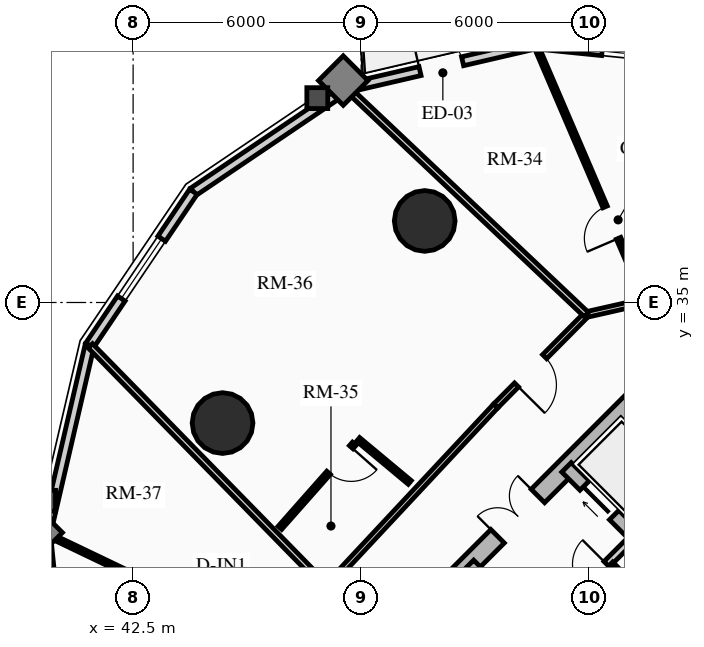
"""IFC4 building model, lengths in metres.
Left out: names, types, materials, properties, quantities, classifications, styles, units other than length and angle.
Written with IfcOpenShell. Run it as: python <this file> out.ifc"""

import sys

from ifc_helpers import new_model, si_unit, direction, frame, frame_2d, origin, origin_2d, place, context, subcontext, project, spatial, rectangle, circle, extrude, source, transform, mapped, element, fill, save


model = new_model("IFC4")
c1 = context("Model", 3, precision=1e-05, world=origin(), true_north=direction((0.0, 1.0)))
c2 = subcontext(c1, "Body", "Model", "MODEL_VIEW")
j1 = project(units=[si_unit("LENGTHUNIT", "METRE"), si_unit("PLANEANGLEUNIT", "RADIAN")], contexts=[c1])
p1 = place(None, origin())
s1 = spatial("IfcSite", under=j1, at=p1, CompositionType="ELEMENT")
p2 = place(p1, origin())
s2 = spatial("IfcBuilding", under=s1, at=p2, CompositionType="ELEMENT")
p3 = place(p2, frame((0.0, 0.0, 30.73)))
s3 = spatial("IfcBuildingStorey", under=s2, at=p3, CompositionType="ELEMENT", Elevation=30.73)
p4 = place(p3, frame((48.838, 25.596, 0.0), z_axis=(0.0, 0.0, 1.0), x_axis=(0.707106781187, 0.707106781187, 0.0)))
e1 = element("IfcWall", 1, at=p4, inside=s3, PredefinedType="SHEAR", context=c2, shape_type="SweptSolid", body=[
    extrude(rectangle(XDim=10.7, YDim=0.5, at=frame_2d((5.35, 0.0))), origin(), (0.0, 0.0, 1.0), 2.91),
])
m1 = source(origin(), c2, "Body", "SweptSolid", [
    extrude(rectangle(XDim=1.5, YDim=2.02, at=frame_2d((0.75, 1.01))), frame((0.0, 0.26, 0.0), z_axis=(0.0, -1.0, 0.0), x_axis=(1.0, 0.0, 0.0)), (0.0, 0.0, 1.0), 0.52),
])
p5 = place(p4, frame((4.6, 0.0, 0.0)))
e2 = element("IfcOpeningElement", 2, at=p5, cuts=e1, PredefinedType="OPENING", context=c2, shape_type="MappedRepresentation", body=[
    mapped(m1, transform((0.0, 0.0, 0.0), x_axis=(1.0, 0.0, 0.0), y_axis=(0.0, 1.0, 0.0), z_axis=(0.0, 0.0, 1.0), scale=1.0)),
])
p6 = place(p3, frame((61.096, 18.338, 0.0), z_axis=(0.0, 0.0, 1.0), x_axis=(-0.707106781187, 0.707106781187, 0.0)))
e3 = element("IfcWall", 3, at=p6, inside=s3, PredefinedType="SHEAR", context=c2, shape_type="SweptSolid", body=[
    extrude(rectangle(XDim=13.8, YDim=0.35, at=frame_2d((6.9, 0.0))), origin(), (0.0, 0.0, 1.0), 2.91),
])
m2 = source(origin(), c2, "Body", "SweptSolid", [
    extrude(rectangle(XDim=1.1, YDim=2.015, at=frame_2d((0.55, 1.007))), frame((0.0, 0.185, 0.0), z_axis=(0.0, -1.0, 0.0), x_axis=(1.0, 0.0, 0.0)), (0.0, 0.0, 1.0), 0.37),
])
p7 = place(p6, frame((4.9, 0.0, 0.0)))
e4 = element("IfcOpeningElement", 4, at=p7, cuts=e3, PredefinedType="OPENING", context=c2, shape_type="MappedRepresentation", body=[
    mapped(m2, transform((0.0, 0.0, 0.0), x_axis=(1.0, 0.0, 0.0), y_axis=(0.0, 1.0, 0.0), z_axis=(0.0, 0.0, 1.0), scale=1.0)),
])
m3 = source(origin(), c2, "Body", "SweptSolid", [
    extrude(rectangle(XDim=1.15, YDim=2.02, at=frame_2d((0.575, 1.01))), frame((0.0, 0.185, 0.0), z_axis=(0.0, -1.0, 0.0), x_axis=(1.0, 0.0, 0.0)), (0.0, 0.0, 1.0), 0.37),
])
p8 = place(p6, frame((7.32, 0.0, 0.0)))
e5 = element("IfcOpeningElement", 5, at=p8, cuts=e3, PredefinedType="OPENING", context=c2, shape_type="MappedRepresentation", body=[
    mapped(m3, transform((0.0, 0.0, 0.0), x_axis=(1.0, 0.0, 0.0), y_axis=(0.0, 1.0, 0.0), z_axis=(0.0, 0.0, 1.0), scale=1.0)),
])
p9 = place(p3, frame((63.662, 20.904, 0.0), z_axis=(0.0, 0.0, 1.0), x_axis=(-0.707106781187, 0.707106781187, 0.0)))
e6 = element("IfcWall", 6, at=p9, inside=s3, PredefinedType="SHEAR", context=c2, shape_type="SweptSolid", body=[
    extrude(rectangle(XDim=13.8, YDim=0.35, at=frame_2d((6.9, 0.0))), origin(), (0.0, 0.0, 1.0), 2.91),
])
p10 = place(p9, frame((10.025, 0.0, 0.0)))
e7 = element("IfcOpeningElement", 7, at=p10, cuts=e6, PredefinedType="OPENING", context=c2, shape_type="MappedRepresentation", body=[
    mapped(m2, transform((0.0, 0.0, 0.0), x_axis=(1.0, 0.0, 0.0), y_axis=(0.0, 1.0, 0.0), z_axis=(0.0, 0.0, 1.0), scale=1.0)),
])
p11 = place(p9, frame((12.025, 0.0, 0.0)))
e8 = element("IfcOpeningElement", 8, at=p11, cuts=e6, PredefinedType="OPENING", context=c2, shape_type="MappedRepresentation", body=[
    mapped(m2, transform((0.0, 0.0, 0.0), x_axis=(1.0, 0.0, 0.0), y_axis=(0.0, 1.0, 0.0), z_axis=(0.0, 0.0, 1.0), scale=1.0)),
])
p12 = place(p9, frame((5.33, 0.0, 0.0)))
e9 = element("IfcOpeningElement", 9, at=p12, cuts=e6, PredefinedType="OPENING", context=c2, shape_type="MappedRepresentation", body=[
    mapped(m3, transform((0.0, 0.0, 0.0), x_axis=(1.0, 0.0, 0.0), y_axis=(0.0, 1.0, 0.0), z_axis=(0.0, 0.0, 1.0), scale=1.0)),
])
for number, where, z_axis, x_axis in (
    (10, (50.173, 37.146, 0.0), (0.0, 0.0, 1.0), (1.0, 0.0, 0.0)),
    (11, (44.854, 31.827, 0.0), (0.0, 0.0, 1.0), (1.0, 0.0, 0.0)),
):
    element("IfcColumn", number, at=place(p3, frame(where, z_axis=z_axis, x_axis=x_axis)), inside=s3, PredefinedType="USERDEFINED", context=c2, shape_type="SweptSolid", body=[
        extrude(circle(Radius=0.8, at=origin_2d()), origin(), (0.0, 0.0, 1.0), 2.91),
    ])
p13 = place(p3, frame((53.09, 41.794, 0.0), z_axis=(0.0, 0.0, 1.0), x_axis=(0.994968263437, -0.100190592135, 0.0)))
e12 = element("IfcWall", 12, at=p13, inside=s3, PredefinedType="SOLIDWALL", context=c2, shape_type="SweptSolid", body=[
    extrude(rectangle(XDim=5.419, YDim=0.24, at=frame_2d((2.71, 0.0))), origin(), (0.0, 0.0, 1.0), 2.073),
])
m4 = source(origin(), c2, "Body", "SweptSolid", [
    extrude(rectangle(XDim=1.9, YDim=1.35, at=frame_2d((0.95, 0.675))), frame((0.0, 0.13, 0.0), z_axis=(0.0, -1.0, 0.0), x_axis=(1.0, 0.0, 0.0)), (0.0, 0.0, 1.0), 0.26),
])
p14 = place(p13, frame((1.76, 0.0, 0.65)))
e13 = element("IfcOpeningElement", 13, at=p14, cuts=e12, PredefinedType="OPENING", context=c2, shape_type="MappedRepresentation", body=[
    mapped(m4, transform((0.0, 0.0, 0.0), x_axis=(1.0, 0.0, 0.0), y_axis=(0.0, 1.0, 0.0), z_axis=(0.0, 0.0, 1.0), scale=1.0)),
])
p15 = place(p3, frame((48.129, 40.644, 0.0), z_axis=(0.0, 0.0, 1.0), x_axis=(0.974167686491, 0.22582585901, 0.0)))
e14 = element("IfcWall", 14, at=p15, inside=s3, PredefinedType="SOLIDWALL", context=c2, shape_type="SweptSolid", body=[
    extrude(rectangle(XDim=5.092, YDim=0.24, at=frame_2d((2.546, 0.0))), origin(), (0.0, 0.0, 1.0), 2.073),
])
m5 = source(origin(), c2, "Body", "SweptSolid", [
    extrude(rectangle(XDim=1.15, YDim=2.005, at=frame_2d((0.575, 1.002))), frame((0.0, 0.13, 0.0), z_axis=(0.0, -1.0, 0.0), x_axis=(1.0, 0.0, 0.0)), (0.0, 0.0, 1.0), 0.26),
])
p16 = place(p15, frame((1.971, 0.0, 0.0)))
e15 = element("IfcOpeningElement", 15, at=p16, cuts=e14, PredefinedType="OPENING", context=c2, shape_type="MappedRepresentation", body=[
    mapped(m5, transform((0.0, 0.0, 0.0), x_axis=(1.0, 0.0, 0.0), y_axis=(0.0, 1.0, 0.0), z_axis=(0.0, 0.0, 1.0), scale=1.0)),
])
p17 = place(p3, frame((44.086, 37.914, 0.0), z_axis=(0.0, 0.0, 1.0), x_axis=(0.828748297084, 0.559621532896, 0.0)))
e16 = element("IfcWall", 16, at=p17, inside=s3, PredefinedType="SOLIDWALL", context=c2, shape_type="SweptSolid", body=[
    extrude(rectangle(XDim=4.879, YDim=0.24, at=frame_2d((2.439, 0.0))), origin(), (0.0, 0.0, 1.0), 2.073),
])
p18 = place(p3, frame((41.356, 33.871, 0.0), z_axis=(0.0, 0.0, 1.0), x_axis=(0.559621532896, 0.828748297084, 0.0)))
e17 = element("IfcWall", 17, at=p18, inside=s3, PredefinedType="SOLIDWALL", context=c2, shape_type="SweptSolid", body=[
    extrude(rectangle(XDim=4.879, YDim=0.24, at=frame_2d((2.439, 0.0))), origin(), (0.0, 0.0, 1.0), 2.073),
])
p19 = place(p18, frame((1.489, 0.0, 0.65)))
e18 = element("IfcOpeningElement", 18, at=p19, cuts=e17, PredefinedType="OPENING", context=c2, shape_type="MappedRepresentation", body=[
    mapped(m4, transform((0.0, 0.0, 0.0), x_axis=(1.0, 0.0, 0.0), y_axis=(0.0, 1.0, 0.0), z_axis=(0.0, 0.0, 1.0), scale=1.0)),
])
p20 = place(p3, frame((40.206, 28.91, 0.0), z_axis=(0.0, 0.0, 1.0), x_axis=(0.22582585901, 0.974167686491, 0.0)))
e19 = element("IfcWall", 19, at=p20, inside=s3, PredefinedType="SOLIDWALL", context=c2, shape_type="SweptSolid", body=[
    extrude(rectangle(XDim=5.092, YDim=0.24, at=frame_2d((2.546, 0.0))), origin(), (0.0, 0.0, 1.0), 2.073),
])
p21 = place(p3, frame((40.749, 23.518, 0.0), z_axis=(0.0, 0.0, 1.0), x_axis=(-0.100190592135, 0.994968263437, 0.0)))
e20 = element("IfcWall", 20, at=p21, inside=s3, PredefinedType="SOLIDWALL", context=c2, shape_type="SweptSolid", body=[
    extrude(rectangle(XDim=5.419, YDim=0.24, at=frame_2d((2.71, 0.0))), origin(), (0.0, 0.0, 1.0), 2.073),
])
m6 = source(origin(), c2, "Body", "SweptSolid", [
    extrude(rectangle(XDim=2.2, YDim=1.35, at=frame_2d((1.1, 0.675))), frame((0.0, 0.13, 0.0), z_axis=(0.0, -1.0, 0.0), x_axis=(1.0, 0.0, 0.0)), (0.0, 0.0, 1.0), 0.26),
])
p22 = place(p21, frame((1.61, 0.0, 0.65)))
e21 = element("IfcOpeningElement", 21, at=p22, cuts=e20, PredefinedType="OPENING", context=c2, shape_type="MappedRepresentation", body=[
    mapped(m6, transform((0.0, 0.0, 0.0), x_axis=(1.0, 0.0, 0.0), y_axis=(0.0, 1.0, 0.0), z_axis=(0.0, 0.0, 1.0), scale=1.0)),
])
p23 = place(p3, frame((53.264, 26.416, 0.0), z_axis=(0.0, 0.0, 1.0), x_axis=(0.707106781187, 0.707106781187, 0.0)))
e22 = element("IfcWall", 22, at=p23, inside=s3, PredefinedType="PARTITIONING", context=c2, shape_type="SweptSolid", body=[
    extrude(rectangle(XDim=3.28, YDim=0.2, at=frame_2d((1.64, 0.0))), origin(), (0.0, 0.0, 1.0), 2.635),
])
m7 = source(origin(), c2, "Body", "SweptSolid", [
    extrude(rectangle(XDim=1.0, YDim=2.015, at=frame_2d((0.5, 1.007))), frame((0.0, 0.11, 0.0), z_axis=(0.0, -1.0, 0.0), x_axis=(1.0, 0.0, 0.0)), (0.0, 0.0, 1.0), 0.22),
])
p24 = place(p23, frame((0.14, 0.0, 0.0)))
e23 = element("IfcOpeningElement", 23, at=p24, cuts=e22, PredefinedType="OPENING", context=c2, shape_type="MappedRepresentation", body=[
    mapped(m7, transform((0.0, 0.0, 0.0), x_axis=(1.0, 0.0, 0.0), y_axis=(0.0, 1.0, 0.0), z_axis=(0.0, 0.0, 1.0), scale=1.0)),
])
m8 = source(origin(), c2, "Body", "SweptSolid", [
    extrude(rectangle(XDim=0.9, YDim=2.005, at=frame_2d((0.45, 1.002))), frame((0.0, 0.11, 0.0), z_axis=(0.0, -1.0, 0.0), x_axis=(1.0, 0.0, 0.0)), (0.0, 0.0, 1.0), 0.22),
])
p25 = place(p23, frame((1.5, 0.0, 0.0)))
e24 = element("IfcOpeningElement", 24, at=p25, cuts=e22, PredefinedType="OPENING", context=c2, shape_type="MappedRepresentation", body=[
    mapped(m8, transform((0.0, 0.0, 0.0), x_axis=(1.0, 0.0, 0.0), y_axis=(0.0, 1.0, 0.0), z_axis=(0.0, 0.0, 1.0), scale=1.0)),
])
p26 = place(p3, frame((56.673, 26.529, 0.0), z_axis=(0.0, 0.0, 1.0), x_axis=(-0.707052764397, 0.70716079385, 0.0)))
e25 = element("IfcWall", 25, at=p26, inside=s3, PredefinedType="PARTITIONING", context=c2, shape_type="SweptSolid", body=[
    extrude(rectangle(XDim=2.26, YDim=0.125, at=frame_2d((1.13, 0.0))), origin(), (0.0, 0.0, 1.0), 2.635),
])
m9 = source(origin(), c2, "Body", "SweptSolid", [
    extrude(rectangle(XDim=0.9, YDim=2.005, at=frame_2d((0.45, 1.002))), frame((0.0, 0.073, 0.0), z_axis=(0.0, -1.0, 0.0), x_axis=(1.0, 0.0, 0.0)), (0.0, 0.0, 1.0), 0.145),
])
p27 = place(p26, frame((0.65, 0.0, 0.0)))
e26 = element("IfcOpeningElement", 26, at=p27, cuts=e25, PredefinedType="OPENING", context=c2, shape_type="MappedRepresentation", body=[
    mapped(m9, transform((0.0, 0.0, 0.0), x_axis=(1.0, 0.0, 0.0), y_axis=(0.0, 1.0, 0.0), z_axis=(0.0, 0.0, 1.0), scale=1.0)),
])
p28 = place(p3, frame((55.984, 35.035, 0.0), z_axis=(0.0, 0.0, 1.0), x_axis=(-0.975290305708, -0.22092718165, 0.0)))
e27 = element("IfcWall", 27, at=p28, inside=s3, PredefinedType="PARTITIONING", context=c2, shape_type="SweptSolid", body=[
    extrude(rectangle(XDim=1.597, YDim=0.15, at=frame_2d((0.798, 0.0))), origin(), (0.0, 0.0, 1.0), 2.205),
])
p29 = place(p3, frame((54.427, 34.683, 0.0), z_axis=(0.0, 0.0, 1.0), x_axis=(-0.704178989986, -0.710022499687, 0.0)))
e28 = element("IfcWall", 28, at=p29, inside=s3, PredefinedType="PARTITIONING", context=c2, shape_type="SweptSolid", body=[
    extrude(rectangle(XDim=3.384, YDim=0.15, at=frame_2d((1.692, 0.0))), origin(), (0.0, 0.0, 1.0), 2.159),
])
m10 = source(origin(), c2, "Body", "SweptSolid", [
    extrude(rectangle(XDim=1.05, YDim=2.015, at=frame_2d((0.525, 1.007))), frame((0.0, 0.085, 0.0), z_axis=(0.0, -1.0, 0.0), x_axis=(1.0, 0.0, 0.0)), (0.0, 0.0, 1.0), 0.17),
])
p30 = place(p29, frame((1.56, 0.0, 0.0)))
e29 = element("IfcOpeningElement", 29, at=p30, cuts=e28, PredefinedType="OPENING", context=c2, shape_type="MappedRepresentation", body=[
    mapped(m10, transform((0.0, 0.0, 0.0), x_axis=(1.0, 0.0, 0.0), y_axis=(0.0, 1.0, 0.0), z_axis=(0.0, 0.0, 1.0), scale=1.0)),
])
p31 = place(p3, frame((52.043, 32.28, 0.0), z_axis=(0.0, 0.0, 1.0), x_axis=(-0.682606081633, -0.730786519661, 0.0)))
e30 = element("IfcWall", 30, at=p31, inside=s3, PredefinedType="PARTITIONING", context=c2, shape_type="SweptSolid", body=[
    extrude(rectangle(XDim=6.527, YDim=0.15, at=frame_2d((3.263, 0.0))), origin(), (0.0, 0.0, 1.0), 2.159),
])
p32 = place(p3, frame((54.427, 34.683, 0.0), z_axis=(0.0, 0.0, 1.0), x_axis=(-0.726732956694, 0.686920089716, 0.0)))
e31 = element("IfcWall", 31, at=p32, inside=s3, PredefinedType="PARTITIONING", context=c2, shape_type="SweptSolid", body=[
    extrude(rectangle(XDim=8.653, YDim=0.16, at=frame_2d((4.326, 0.0))), origin(), (0.0, 0.0, 1.0), 2.073),
])
p33 = place(p3, frame((47.588, 27.51, 0.0), z_axis=(0.0, 0.0, 1.0), x_axis=(-0.699371977892, 0.714757886657, 0.0)))
e32 = element("IfcWall", 32, at=p33, inside=s3, PredefinedType="PARTITIONING", context=c2, shape_type="SweptSolid", body=[
    extrude(rectangle(XDim=8.886, YDim=0.16, at=frame_2d((4.443, 0.0))), origin(), (0.0, 0.0, 1.0), 2.073),
])
p34 = place(p3, frame((55.984, 35.035, 0.0), z_axis=(0.0, 0.0, 1.0), x_axis=(-0.394244760106, 0.919005478291, 0.0)))
e33 = element("IfcWall", 33, at=p34, inside=s3, PredefinedType="PARTITIONING", context=c2, shape_type="SweptSolid", body=[
    extrude(rectangle(XDim=7.333, YDim=0.125, at=frame_2d((3.667, 0.0))), origin(), (0.0, 0.0, 1.0), 2.073),
])
p35 = place(p34, frame((1.8, 0.0, 0.0)))
e34 = element("IfcOpeningElement", 34, at=p35, cuts=e33, PredefinedType="OPENING", context=c2, shape_type="MappedRepresentation", body=[
    mapped(m9, transform((0.0, 0.0, 0.0), x_axis=(1.0, 0.0, 0.0), y_axis=(0.0, 1.0, 0.0), z_axis=(0.0, 0.0, 1.0), scale=1.0)),
])
p36 = place(p3, frame((49.78, 30.264, 0.0), z_axis=(0.0, 0.0, 1.0), x_axis=(-0.768209972595, 0.640197967824, 0.0)))
e35 = element("IfcWall", 35, at=p36, inside=s3, PredefinedType="PARTITIONING", context=c2, shape_type="SweptSolid", body=[
    extrude(rectangle(XDim=1.77, YDim=0.125, at=frame_2d((0.885, 0.0))), origin(), (0.0, 0.0, 1.0), 2.635),
])
p37 = place(p3, frame((48.318, 31.282, 0.0), z_axis=(0.0, 0.0, 1.0), x_axis=(-0.662365127428, -0.749181178333, 0.0)))
e36 = element("IfcWall", 36, at=p37, inside=s3, PredefinedType="PARTITIONING", context=c2, shape_type="SweptSolid", body=[
    extrude(rectangle(XDim=2.953, YDim=0.125, at=frame_2d((1.477, 0.0))), origin(), (0.0, 0.0, 1.0), 2.159),
])
p38 = place(p37, frame((0.12, 0.0, 0.0)))
e37 = element("IfcOpeningElement", 37, at=p38, cuts=e36, PredefinedType="OPENING", context=c2, shape_type="MappedRepresentation", body=[
    mapped(m9, transform((0.0, 0.0, 0.0), x_axis=(1.0, 0.0, 0.0), y_axis=(0.0, 1.0, 0.0), z_axis=(0.0, 0.0, 1.0), scale=1.0)),
])
p39 = place(p3, frame((46.543, 25.882, 0.0), z_axis=(0.0, 0.0, 1.0), x_axis=(-0.901937110034, 0.431867398103, 0.0)))
e38 = element("IfcWall", 38, at=p39, inside=s3, PredefinedType="PARTITIONING", context=c2, shape_type="SweptSolid", body=[
    extrude(rectangle(XDim=7.004, YDim=0.125, at=frame_2d((3.502, 0.0))), origin(), (0.0, 0.0, 1.0), 2.073),
])
p40 = place(p39, frame((1.8, 0.0, 0.0)))
e39 = element("IfcOpeningElement", 39, at=p40, cuts=e38, PredefinedType="OPENING", context=c2, shape_type="MappedRepresentation", body=[
    mapped(m9, transform((0.0, 0.0, 0.0), x_axis=(1.0, 0.0, 0.0), y_axis=(0.0, 1.0, 0.0), z_axis=(0.0, 0.0, 1.0), scale=1.0)),
])
m11 = source(origin(), c2, "Body", "SweptSolid", [
    extrude(rectangle(XDim=1.9, YDim=1.35, at=frame_2d((0.95, 0.675))), frame((0.0, 0.03, 0.0), z_axis=(0.0, -1.0, 0.0), x_axis=(1.0, 0.0, 0.0)), (0.0, 0.0, 1.0), 0.06),
])
p41 = place(p14, origin())
e40 = element("IfcWindow", 40, at=p41, inside=s3, PartitioningType="DOUBLE_PANEL_VERTICAL", PredefinedType="WINDOW", context=c2, shape_type="MappedRepresentation", body=[
    mapped(m11, transform((0.0, 0.0, 0.0), x_axis=(1.0, 0.0, 0.0), y_axis=(0.0, 1.0, 0.0), z_axis=(0.0, 0.0, 1.0), scale=1.0)),
])
fill(e13, e40)
m12 = source(origin(), c2, "Body", "SweptSolid", [
    extrude(rectangle(XDim=1.15, YDim=2.005, at=frame_2d((0.575, 1.002))), frame((0.0, 0.025, 0.0), z_axis=(0.0, -1.0, 0.0), x_axis=(1.0, 0.0, 0.0)), (0.0, 0.0, 1.0), 0.05),
])
p42 = place(p16, origin())
e41 = element("IfcDoor", 41, at=p42, inside=s3, OperationType="SINGLE_SWING_LEFT", PredefinedType="DOOR", context=c2, shape_type="MappedRepresentation", body=[
    mapped(m12, transform((0.0, 0.0, 0.0), x_axis=(1.0, 0.0, 0.0), y_axis=(0.0, 1.0, 0.0), z_axis=(0.0, 0.0, 1.0), scale=1.0)),
])
fill(e15, e41)
p43 = place(p19, origin())
e42 = element("IfcWindow", 42, at=p43, inside=s3, PartitioningType="DOUBLE_PANEL_VERTICAL", PredefinedType="WINDOW", context=c2, shape_type="MappedRepresentation", body=[
    mapped(m11, transform((0.0, 0.0, 0.0), x_axis=(1.0, 0.0, 0.0), y_axis=(0.0, 1.0, 0.0), z_axis=(0.0, 0.0, 1.0), scale=1.0)),
])
fill(e18, e42)
m13 = source(origin(), c2, "Body", "SweptSolid", [
    extrude(rectangle(XDim=1.1, YDim=2.015, at=frame_2d((0.55, 1.007))), frame((0.0, 0.025, 0.0), z_axis=(0.0, -1.0, 0.0), x_axis=(1.0, 0.0, 0.0)), (0.0, 0.0, 1.0), 0.05),
])
p44 = place(p11, origin())
e43 = element("IfcDoor", 43, at=p44, inside=s3, OperationType="SLIDING_TO_RIGHT", PredefinedType="DOOR", context=c2, shape_type="MappedRepresentation", body=[
    mapped(m13, transform((0.0, 0.0, 0.0), x_axis=(1.0, 0.0, 0.0), y_axis=(0.0, 1.0, 0.0), z_axis=(0.0, 0.0, 1.0), scale=1.0)),
])
fill(e8, e43)
m14 = source(origin(), c2, "Body", "SweptSolid", [
    extrude(rectangle(XDim=1.5, YDim=2.02, at=frame_2d((0.75, 1.01))), frame((0.0, 0.025, 0.0), z_axis=(0.0, -1.0, 0.0), x_axis=(1.0, 0.0, 0.0)), (0.0, 0.0, 1.0), 0.05),
])
p45 = place(p5, origin())
e44 = element("IfcDoor", 44, at=p45, inside=s3, OperationType="DOUBLE_DOOR_SINGLE_SWING", PredefinedType="DOOR", context=c2, shape_type="MappedRepresentation", body=[
    mapped(m14, transform((0.0, 0.0, 0.0), x_axis=(1.0, 0.0, 0.0), y_axis=(0.0, 1.0, 0.0), z_axis=(0.0, 0.0, 1.0), scale=1.0)),
])
fill(e2, e44)
m15 = source(origin(), c2, "Body", "SweptSolid", [
    extrude(rectangle(XDim=0.9, YDim=2.005, at=frame_2d((0.45, 1.002))), frame((0.0, 0.025, 0.0), z_axis=(0.0, -1.0, 0.0), x_axis=(1.0, 0.0, 0.0)), (0.0, 0.0, 1.0), 0.05),
])
p46 = place(p25, origin())
e45 = element("IfcDoor", 45, at=p46, inside=s3, OperationType="SINGLE_SWING_RIGHT", PredefinedType="DOOR", context=c2, shape_type="MappedRepresentation", body=[
    mapped(m15, transform((0.0, 0.0, 0.0), x_axis=(1.0, 0.0, 0.0), y_axis=(0.0, 1.0, 0.0), z_axis=(0.0, 0.0, 1.0), scale=1.0)),
])
fill(e24, e45)
p47 = place(p35, origin())
e46 = element("IfcDoor", 46, at=p47, inside=s3, OperationType="SINGLE_SWING_LEFT", PredefinedType="DOOR", context=c2, shape_type="MappedRepresentation", body=[
    mapped(m15, transform((0.0, 0.0, 0.0), x_axis=(1.0, 0.0, 0.0), y_axis=(0.0, 1.0, 0.0), z_axis=(0.0, 0.0, 1.0), scale=1.0)),
])
fill(e34, e46)
m16 = source(origin(), c2, "Body", "SweptSolid", [
    extrude(rectangle(XDim=1.05, YDim=2.015, at=frame_2d((0.525, 1.007))), frame((0.0, 0.025, 0.0), z_axis=(0.0, -1.0, 0.0), x_axis=(1.0, 0.0, 0.0)), (0.0, 0.0, 1.0), 0.05),
])
p48 = place(p30, origin())
e47 = element("IfcDoor", 47, at=p48, inside=s3, OperationType="SINGLE_SWING_RIGHT", PredefinedType="DOOR", context=c2, shape_type="MappedRepresentation", body=[
    mapped(m16, transform((0.0, 0.0, 0.0), x_axis=(1.0, 0.0, 0.0), y_axis=(0.0, 1.0, 0.0), z_axis=(0.0, 0.0, 1.0), scale=1.0)),
])
fill(e29, e47)
p49 = place(p38, origin())
e48 = element("IfcDoor", 48, at=p49, inside=s3, OperationType="SINGLE_SWING_LEFT", PredefinedType="DOOR", context=c2, shape_type="MappedRepresentation", body=[
    mapped(m15, transform((0.0, 0.0, 0.0), x_axis=(1.0, 0.0, 0.0), y_axis=(0.0, 1.0, 0.0), z_axis=(0.0, 0.0, 1.0), scale=1.0)),
])
fill(e37, e48)
save(model, sys.argv[1])
